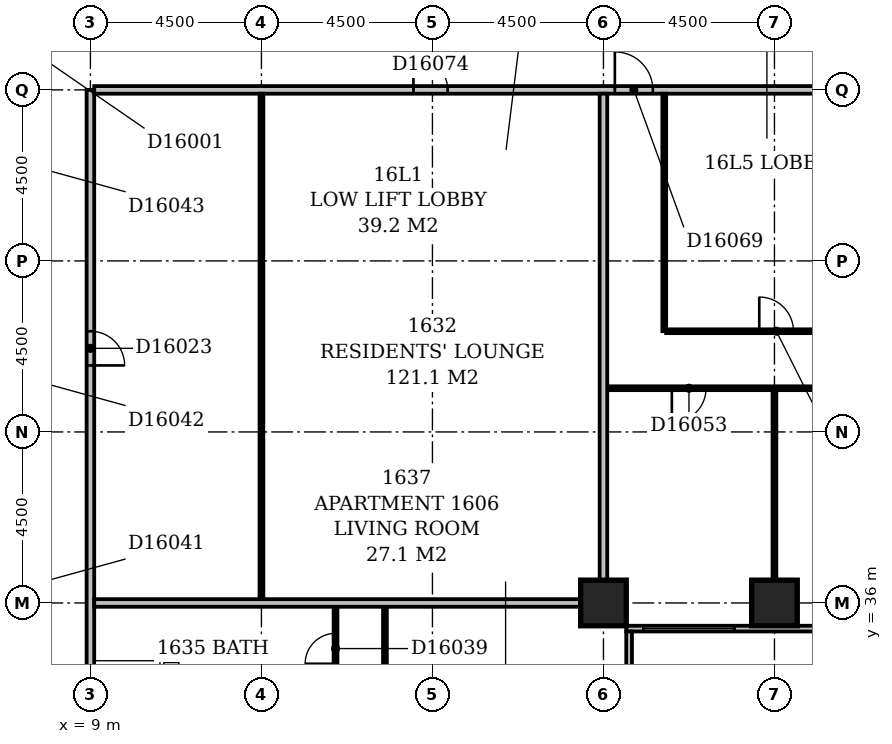
"""IFC4 building model, lengths in metres.
Left out: names, types, materials, properties, quantities, classifications, styles, units other than length and angle.
Written with IfcOpenShell. Run it as: python <this file> out.ifc"""

import sys

from ifc_helpers import new_model, si_unit, direction, frame, frame_2d, origin, origin_2d, place, context, subcontext, project, spatial, rectangle, extrude, element, fill, save


model = new_model("IFC4")
c1 = context("Model", 3, precision=1e-05, world=origin(), true_north=direction((0.0, 1.0)))
c2 = subcontext(c1, "Body", "Model", "MODEL_VIEW")
j1 = project(units=[si_unit("LENGTHUNIT", "METRE"), si_unit("PLANEANGLEUNIT", "RADIAN")], contexts=[c1])
p1 = place(None, origin())
s1 = spatial("IfcSite", under=j1, at=p1, CompositionType="ELEMENT")
p2 = place(p1, origin())
s2 = spatial("IfcBuilding", under=s1, at=p2, CompositionType="ELEMENT")
p3 = place(p2, frame((0.0, 0.0, 68.6)))
s3 = spatial("IfcBuildingStorey", under=s2, at=p3, CompositionType="ELEMENT", Elevation=68.6)
for number, where, z_axis, x_axis in (
    (1, (22.5, 36.0, -0.3), (0.0, 0.0, 1.0), (1.0, 0.0, 0.0)),
    (2, (27.0, 36.0, -0.3), (0.0, 0.0, 1.0), (1.0, 0.0, 0.0)),
):
    element("IfcColumn", number, at=place(p3, frame(where, z_axis=z_axis, x_axis=x_axis)), inside=s3, PredefinedType="COLUMN", context=c2, shape_type="SweptSolid", body=[
        extrude(rectangle(XDim=1.2, YDim=1.2, at=origin_2d()), origin(), (0.0, 0.0, 1.0), 3.6),
    ])
p4 = place(p3, frame((23.175, 17.4, 0.0), z_axis=(0.0, 0.0, 1.0), x_axis=(0.0, 1.0, 0.0)))
e3 = element("IfcWall", 3, at=p4, inside=s3, PredefinedType="STANDARD", context=c2, shape_type="SweptSolid", body=[
    extrude(rectangle(XDim=17.85, YDim=0.15, at=frame_2d((8.925, 0.0))), origin(), (0.0, 0.0, 1.0), 2.7),
])
p5 = place(p4, frame((1.65, 0.0, 0.6)))
e4 = element("IfcOpeningElement", 4, at=p5, cuts=e3, PredefinedType="OPENING", context=c2, shape_type="SweptSolid", body=[
    extrude(rectangle(XDim=2.4, YDim=1.8, at=frame_2d((1.2, 0.9))), frame((0.0, 0.087, 0.0), z_axis=(0.0, -1.0, 0.0), x_axis=(1.0, 0.0, 0.0)), (0.0, 0.0, 1.0), 0.174),
])
p6 = place(p4, frame((6.15, 0.0, 0.6)))
e5 = element("IfcOpeningElement", 5, at=p6, cuts=e3, PredefinedType="OPENING", context=c2, shape_type="SweptSolid", body=[
    extrude(rectangle(XDim=2.4, YDim=1.8, at=frame_2d((1.2, 0.9))), frame((0.0, 0.087, 0.0), z_axis=(0.0, -1.0, 0.0), x_axis=(1.0, 0.0, 0.0)), (0.0, 0.0, 1.0), 0.174),
])
p7 = place(p4, frame((10.65, 0.0, 0.6)))
e6 = element("IfcOpeningElement", 6, at=p7, cuts=e3, PredefinedType="OPENING", context=c2, shape_type="SweptSolid", body=[
    extrude(rectangle(XDim=2.4, YDim=1.8, at=frame_2d((1.2, 0.9))), frame((0.0, 0.087, 0.0), z_axis=(0.0, -1.0, 0.0), x_axis=(1.0, 0.0, 0.0)), (0.0, 0.0, 1.0), 0.174),
])
p8 = place(p4, frame((14.756, 0.0, 0.6)))
e7 = element("IfcOpeningElement", 7, at=p8, cuts=e3, PredefinedType="OPENING", context=c2, shape_type="SweptSolid", body=[
    extrude(rectangle(XDim=0.45, YDim=1.8, at=frame_2d((0.225, 0.9))), frame((0.0, 0.087, 0.0), z_axis=(0.0, -1.0, 0.0), x_axis=(1.0, 0.0, 0.0)), (0.0, 0.0, 1.0), 0.174),
])
p9 = place(p3, frame((23.1, 35.325, 0.0), z_axis=(0.0, 0.0, 1.0), x_axis=(1.0, 0.0, 0.0)))
e8 = element("IfcWall", 8, at=p9, inside=s3, PredefinedType="STANDARD", context=c2, shape_type="SweptSolid", body=[
    extrude(rectangle(XDim=45.15, YDim=0.15, at=frame_2d((22.575, 0.0))), origin(), (0.0, 0.0, 1.0), 2.7),
])
p10 = place(p9, frame((0.45, 0.0, 0.6)))
e9 = element("IfcOpeningElement", 9, at=p10, cuts=e8, PredefinedType="OPENING", context=c2, shape_type="SweptSolid", body=[
    extrude(rectangle(XDim=2.4, YDim=1.8, at=frame_2d((1.2, 0.9))), frame((0.0, 0.087, 0.0), z_axis=(0.0, -1.0, 0.0), x_axis=(1.0, 0.0, 0.0)), (0.0, 0.0, 1.0), 0.174),
])
p11 = place(p9, frame((4.95, 0.0, 0.6)))
e10 = element("IfcOpeningElement", 10, at=p11, cuts=e8, PredefinedType="OPENING", context=c2, shape_type="SweptSolid", body=[
    extrude(rectangle(XDim=2.4, YDim=1.8, at=frame_2d((1.2, 0.9))), frame((0.0, 0.087, 0.0), z_axis=(0.0, -1.0, 0.0), x_axis=(1.0, 0.0, 0.0)), (0.0, 0.0, 1.0), 0.174),
])
p12 = place(p9, frame((9.243, 0.0, 0.6)))
e11 = element("IfcOpeningElement", 11, at=p12, cuts=e8, PredefinedType="OPENING", context=c2, shape_type="SweptSolid", body=[
    extrude(rectangle(XDim=1.8, YDim=1.8, at=frame_2d((0.9, 0.9))), frame((0.0, 0.087, 0.0), z_axis=(0.0, -1.0, 0.0), x_axis=(1.0, 0.0, 0.0)), (0.0, 0.0, 1.0), 0.174),
])
p13 = place(p9, frame((14.97, 0.0, 0.6)))
e12 = element("IfcOpeningElement", 12, at=p13, cuts=e8, PredefinedType="OPENING", context=c2, shape_type="SweptSolid", body=[
    extrude(rectangle(XDim=1.5, YDim=1.8, at=frame_2d((0.75, 0.9))), frame((0.0, 0.087, 0.0), z_axis=(0.0, -1.0, 0.0), x_axis=(1.0, 0.0, 0.0)), (0.0, 0.0, 1.0), 0.174),
])
p14 = place(p9, frame((18.45, 0.0, 0.6)))
e13 = element("IfcOpeningElement", 13, at=p14, cuts=e8, PredefinedType="OPENING", context=c2, shape_type="SweptSolid", body=[
    extrude(rectangle(XDim=2.4, YDim=1.8, at=frame_2d((1.2, 0.9))), frame((0.0, 0.087, 0.0), z_axis=(0.0, -1.0, 0.0), x_axis=(1.0, 0.0, 0.0)), (0.0, 0.0, 1.0), 0.174),
])
p15 = place(p9, frame((22.95, 0.0, 0.6)))
e14 = element("IfcOpeningElement", 14, at=p15, cuts=e8, PredefinedType="OPENING", context=c2, shape_type="SweptSolid", body=[
    extrude(rectangle(XDim=2.4, YDim=1.8, at=frame_2d((1.2, 0.9))), frame((0.0, 0.087, 0.0), z_axis=(0.0, -1.0, 0.0), x_axis=(1.0, 0.0, 0.0)), (0.0, 0.0, 1.0), 0.174),
])
p16 = place(p9, frame((27.45, 0.0, 0.6)))
e15 = element("IfcOpeningElement", 15, at=p16, cuts=e8, PredefinedType="OPENING", context=c2, shape_type="SweptSolid", body=[
    extrude(rectangle(XDim=2.4, YDim=1.8, at=frame_2d((1.2, 0.9))), frame((0.0, 0.087, 0.0), z_axis=(0.0, -1.0, 0.0), x_axis=(1.0, 0.0, 0.0)), (0.0, 0.0, 1.0), 0.174),
])
p17 = place(p9, frame((31.95, 0.0, 0.6)))
e16 = element("IfcOpeningElement", 16, at=p17, cuts=e8, PredefinedType="OPENING", context=c2, shape_type="SweptSolid", body=[
    extrude(rectangle(XDim=2.4, YDim=1.8, at=frame_2d((1.2, 0.9))), frame((0.0, 0.087, 0.0), z_axis=(0.0, -1.0, 0.0), x_axis=(1.0, 0.0, 0.0)), (0.0, 0.0, 1.0), 0.174),
])
p18 = place(p9, frame((36.45, 0.0, 0.6)))
e17 = element("IfcOpeningElement", 17, at=p18, cuts=e8, PredefinedType="OPENING", context=c2, shape_type="SweptSolid", body=[
    extrude(rectangle(XDim=2.4, YDim=1.8, at=frame_2d((1.2, 0.9))), frame((0.0, 0.087, 0.0), z_axis=(0.0, -1.0, 0.0), x_axis=(1.0, 0.0, 0.0)), (0.0, 0.0, 1.0), 0.174),
])
p19 = place(p9, frame((40.706, 0.0, 0.6)))
e18 = element("IfcOpeningElement", 18, at=p19, cuts=e8, PredefinedType="OPENING", context=c2, shape_type="SweptSolid", body=[
    extrude(rectangle(XDim=1.2, YDim=1.8, at=frame_2d((0.6, 0.9))), frame((0.0, 0.087, 0.0), z_axis=(0.0, -1.0, 0.0), x_axis=(1.0, 0.0, 0.0)), (0.0, 0.0, 1.0), 0.174),
])
p20 = place(p3, frame((9.0, 5.0, 0.0), z_axis=(0.0, 0.0, 1.0), x_axis=(0.0, 1.0, 0.0)))
e19 = element("IfcWall", 19, at=p20, inside=s3, PredefinedType="PARTITIONING", context=c2, shape_type="SweptSolid", body=[
    extrude(rectangle(XDim=44.5, YDim=0.2, at=frame_2d((22.25, 0.0))), origin(), (0.0, 0.0, 1.0), 3.3),
])
p21 = place(p20, frame((22.3, 0.0, 0.0)))
e20 = element("IfcOpeningElement", 20, at=p21, cuts=e19, PredefinedType="OPENING", context=c2, shape_type="SweptSolid", body=[
    extrude(rectangle(XDim=1.0, YDim=2.1, at=frame_2d((0.5, 1.05))), frame((0.0, 0.112, 0.0), z_axis=(0.0, -1.0, 0.0), x_axis=(1.0, 0.0, 0.0)), (0.0, 0.0, 1.0), 0.224),
])
p22 = place(p20, frame((15.7, 0.0, 0.0)))
e21 = element("IfcOpeningElement", 21, at=p22, cuts=e19, PredefinedType="OPENING", context=c2, shape_type="SweptSolid", body=[
    extrude(rectangle(XDim=1.0, YDim=2.1, at=frame_2d((0.5, 1.05))), frame((0.0, 0.112, 0.0), z_axis=(0.0, -1.0, 0.0), x_axis=(1.0, 0.0, 0.0)), (0.0, 0.0, 1.0), 0.224),
])
p23 = place(p20, frame((10.45, 0.0, 0.0)))
e22 = element("IfcOpeningElement", 22, at=p23, cuts=e19, PredefinedType="OPENING", context=c2, shape_type="SweptSolid", body=[
    extrude(rectangle(XDim=1.0, YDim=2.1, at=frame_2d((0.5, 1.05))), frame((0.0, 0.112, 0.0), z_axis=(0.0, -1.0, 0.0), x_axis=(1.0, 0.0, 0.0)), (0.0, 0.0, 1.0), 0.224),
])
p24 = place(p20, frame((5.95, 0.0, 0.0)))
e23 = element("IfcOpeningElement", 23, at=p24, cuts=e19, PredefinedType="OPENING", context=c2, shape_type="SweptSolid", body=[
    extrude(rectangle(XDim=1.0, YDim=2.1, at=frame_2d((0.5, 1.05))), frame((0.0, 0.112, 0.0), z_axis=(0.0, -1.0, 0.0), x_axis=(1.0, 0.0, 0.0)), (0.0, 0.0, 1.0), 0.224),
])
p25 = place(p20, frame((37.25, 0.0, 0.0)))
e24 = element("IfcOpeningElement", 24, at=p25, cuts=e19, PredefinedType="OPENING", context=c2, shape_type="SweptSolid", body=[
    extrude(rectangle(XDim=0.9, YDim=2.1, at=frame_2d((0.45, 1.05))), frame((0.0, 0.112, 0.0), z_axis=(0.0, -1.0, 0.0), x_axis=(1.0, 0.0, 0.0)), (0.0, 0.0, 1.0), 0.224),
])
p26 = place(p20, frame((1.5, 0.0, 0.0)))
e25 = element("IfcOpeningElement", 25, at=p26, cuts=e19, PredefinedType="OPENING", context=c2, shape_type="SweptSolid", body=[
    extrude(rectangle(XDim=0.9, YDim=2.1, at=frame_2d((0.45, 1.05))), frame((0.0, 0.112, 0.0), z_axis=(0.0, -1.0, 0.0), x_axis=(1.0, 0.0, 0.0)), (0.0, 0.0, 1.0), 0.224),
])
p27 = place(p3, frame((16.75, 27.1, 0.0), z_axis=(0.0, 0.0, 1.0), x_axis=(0.0, 1.0, 0.0)))
e26 = element("IfcWall", 26, at=p27, inside=s3, PredefinedType="PARTITIONING", context=c2, shape_type="SweptSolid", body=[
    extrude(rectangle(XDim=8.8, YDim=0.1, at=frame_2d((4.4, 0.0))), origin(), (0.0, 0.0, 1.0), 3.3),
])
p28 = place(p27, frame((1.7, 0.0, 0.0)))
e27 = element("IfcOpeningElement", 27, at=p28, cuts=e26, PredefinedType="OPENING", context=c2, shape_type="SweptSolid", body=[
    extrude(rectangle(XDim=0.9, YDim=2.1, at=frame_2d((0.45, 1.05))), frame((0.0, 0.062, 0.0), z_axis=(0.0, -1.0, 0.0), x_axis=(1.0, 0.0, 0.0)), (0.0, 0.0, 1.0), 0.124),
])
p29 = place(p27, frame((6.2, 0.0, 0.0)))
e28 = element("IfcOpeningElement", 28, at=p29, cuts=e26, PredefinedType="OPENING", context=c2, shape_type="SweptSolid", body=[
    extrude(rectangle(XDim=0.9, YDim=2.1, at=frame_2d((0.45, 1.05))), frame((0.0, 0.062, 0.0), z_axis=(0.0, -1.0, 0.0), x_axis=(1.0, 0.0, 0.0)), (0.0, 0.0, 1.0), 0.124),
])
p30 = place(p3, frame((15.45, 28.6, 0.0), z_axis=(0.0, 0.0, 1.0), x_axis=(0.0, 1.0, 0.0)))
e29 = element("IfcWall", 29, at=p30, inside=s3, PredefinedType="PARTITIONING", context=c2, shape_type="SweptSolid", body=[
    extrude(rectangle(XDim=7.3, YDim=0.1, at=frame_2d((3.65, 0.0))), origin(), (0.0, 0.0, 1.0), 3.3),
])
p31 = place(p30, frame((5.8, 0.0, 0.0)))
e30 = element("IfcOpeningElement", 30, at=p31, cuts=e29, PredefinedType="OPENING", context=c2, shape_type="SweptSolid", body=[
    extrude(rectangle(XDim=0.8, YDim=2.1, at=frame_2d((0.4, 1.05))), frame((0.0, 0.062, 0.0), z_axis=(0.0, -1.0, 0.0), x_axis=(1.0, 0.0, 0.0)), (0.0, 0.0, 1.0), 0.124),
])
p32 = place(p30, frame((2.05, 0.0, 0.0)))
e31 = element("IfcOpeningElement", 31, at=p32, cuts=e29, PredefinedType="OPENING", context=c2, shape_type="SweptSolid", body=[
    extrude(rectangle(XDim=0.9, YDim=2.1, at=frame_2d((0.45, 1.05))), frame((0.0, 0.062, 0.0), z_axis=(0.0, -1.0, 0.0), x_axis=(1.0, 0.0, 0.0)), (0.0, 0.0, 1.0), 0.124),
])
p33 = place(p3, frame((9.1, 36.0, 0.0), z_axis=(0.0, 0.0, 1.0), x_axis=(1.0, 0.0, 0.0)))
e32 = element("IfcWall", 32, at=p33, inside=s3, PredefinedType="PARTITIONING", context=c2, shape_type="SweptSolid", body=[
    extrude(rectangle(XDim=12.8, YDim=0.2, at=frame_2d((6.4, 0.0))), origin(), (0.0, 0.0, 1.0), 2.4),
])
p34 = place(p3, frame((13.5, 36.1, 0.0), z_axis=(0.0, 0.0, 1.0), x_axis=(0.0, 1.0, 0.0)))
e33 = element("IfcWall", 33, at=p34, inside=s3, PredefinedType="PARTITIONING", context=c2, shape_type="SweptSolid", body=[
    extrude(rectangle(XDim=13.3, YDim=0.1, at=frame_2d((6.65, 0.0))), origin(), (0.0, 0.0, 1.0), 3.3),
])
p35 = place(p3, frame((22.5, 36.6, 0.0), z_axis=(0.0, 0.0, 1.0), x_axis=(0.0, 1.0, 0.0)))
e34 = element("IfcWall", 34, at=p35, inside=s3, PredefinedType="PARTITIONING", context=c2, shape_type="SweptSolid", body=[
    extrude(rectangle(XDim=12.8, YDim=0.2, at=frame_2d((6.4, 0.0))), origin(), (0.0, 0.0, 1.0), 3.3),
])
p36 = place(p3, frame((27.0, 36.6, 0.0), z_axis=(0.0, 0.0, 1.0), x_axis=(0.0, 1.0, 0.0)))
e35 = element("IfcWall", 35, at=p36, inside=s3, PredefinedType="PARTITIONING", context=c2, shape_type="SweptSolid", body=[
    extrude(rectangle(XDim=5.0, YDim=0.1, at=frame_2d((2.5, 0.0))), origin(), (0.0, 0.0, 1.0), 2.6),
])
p37 = place(p3, frame((22.6, 41.65, 0.0), z_axis=(0.0, 0.0, 1.0), x_axis=(1.0, 0.0, 0.0)))
e36 = element("IfcWall", 36, at=p37, inside=s3, PredefinedType="PARTITIONING", context=c2, shape_type="SweptSolid", body=[
    extrude(rectangle(XDim=13.3, YDim=0.1, at=frame_2d((6.65, 0.0))), origin(), (0.0, 0.0, 1.0), 3.3),
])
p38 = place(p37, frame((1.7, 0.0, 0.0)))
e37 = element("IfcOpeningElement", 37, at=p38, cuts=e36, PredefinedType="OPENING", context=c2, shape_type="SweptSolid", body=[
    extrude(rectangle(XDim=0.9, YDim=2.1, at=frame_2d((0.45, 1.05))), frame((0.0, 0.062, 0.0), z_axis=(0.0, -1.0, 0.0), x_axis=(1.0, 0.0, 0.0)), (0.0, 0.0, 1.0), 0.124),
])
p39 = place(p37, frame((6.2, 0.0, 0.0)))
e38 = element("IfcOpeningElement", 38, at=p39, cuts=e36, PredefinedType="OPENING", context=c2, shape_type="SweptSolid", body=[
    extrude(rectangle(XDim=0.9, YDim=2.1, at=frame_2d((0.45, 1.05))), frame((0.0, 0.062, 0.0), z_axis=(0.0, -1.0, 0.0), x_axis=(1.0, 0.0, 0.0)), (0.0, 0.0, 1.0), 0.124),
])
p40 = place(p37, frame((10.7, 0.0, 0.0)))
e39 = element("IfcOpeningElement", 39, at=p40, cuts=e36, PredefinedType="OPENING", context=c2, shape_type="SweptSolid", body=[
    extrude(rectangle(XDim=0.9, YDim=2.1, at=frame_2d((0.45, 1.05))), frame((0.0, 0.062, 0.0), z_axis=(0.0, -1.0, 0.0), x_axis=(1.0, 0.0, 0.0)), (0.0, 0.0, 1.0), 0.124),
])
p41 = place(p3, frame((24.1, 43.15, 0.0), z_axis=(0.0, 0.0, 1.0), x_axis=(0.0, 1.0, 0.0)))
e40 = element("IfcWall", 40, at=p41, inside=s3, PredefinedType="PARTITIONING", context=c2, shape_type="SweptSolid", body=[
    extrude(rectangle(XDim=6.25, YDim=0.1, at=frame_2d((3.125, 0.0))), origin(), (0.0, 0.0, 1.0), 3.3),
])
p42 = place(p3, frame((24.15, 43.15, 0.0), z_axis=(0.0, 0.0, 1.0), x_axis=(1.0, 0.0, 0.0)))
e41 = element("IfcWall", 41, at=p42, inside=s3, PredefinedType="PARTITIONING", context=c2, shape_type="SweptSolid", body=[
    extrude(rectangle(XDim=11.75, YDim=0.1, at=frame_2d((5.875, 0.0))), origin(), (0.0, 0.0, 1.0), 3.3),
])
p43 = place(p42, frame((6.65, 0.0, 0.0)))
e42 = element("IfcOpeningElement", 42, at=p43, cuts=e41, PredefinedType="OPENING", context=c2, shape_type="SweptSolid", body=[
    extrude(rectangle(XDim=0.8, YDim=2.1, at=frame_2d((0.4, 1.05))), frame((0.0, 0.062, 0.0), z_axis=(0.0, -1.0, 0.0), x_axis=(1.0, 0.0, 0.0)), (0.0, 0.0, 1.0), 0.124),
])
p44 = place(p42, frame((2.45, 0.0, 0.0)))
e43 = element("IfcOpeningElement", 43, at=p44, cuts=e41, PredefinedType="OPENING", context=c2, shape_type="SweptSolid", body=[
    extrude(rectangle(XDim=0.9, YDim=2.1, at=frame_2d((0.45, 1.05))), frame((0.0, 0.062, 0.0), z_axis=(0.0, -1.0, 0.0), x_axis=(1.0, 0.0, 0.0)), (0.0, 0.0, 1.0), 0.124),
])
p45 = place(p42, frame((8.65, 0.0, 0.0)))
e44 = element("IfcOpeningElement", 44, at=p45, cuts=e41, PredefinedType="OPENING", context=c2, shape_type="SweptSolid", body=[
    extrude(rectangle(XDim=0.8, YDim=2.1, at=frame_2d((0.4, 1.05))), frame((0.0, 0.062, 0.0), z_axis=(0.0, -1.0, 0.0), x_axis=(1.0, 0.0, 0.0)), (0.0, 0.0, 1.0), 0.124),
])
p46 = place(p42, frame((10.45, 0.0, 0.0)))
e45 = element("IfcOpeningElement", 45, at=p46, cuts=e41, PredefinedType="OPENING", context=c2, shape_type="SweptSolid", body=[
    extrude(rectangle(XDim=0.8, YDim=2.1, at=frame_2d((0.4, 1.05))), frame((0.0, 0.062, 0.0), z_axis=(0.0, -1.0, 0.0), x_axis=(1.0, 0.0, 0.0)), (0.0, 0.0, 1.0), 0.124),
])
p47 = place(p3, frame((9.1, 49.5, 0.0), z_axis=(0.0, 0.0, 1.0), x_axis=(1.0, 0.0, 0.0)))
e46 = element("IfcWall", 46, at=p47, inside=s3, PredefinedType="PARTITIONING", context=c2, shape_type="SweptSolid", body=[
    extrude(rectangle(XDim=57.8, YDim=0.2, at=frame_2d((28.9, 0.0))), origin(), (0.0, 0.0, 1.0), 3.3),
])
p48 = place(p47, frame((13.7, 0.0, 0.0)))
e47 = element("IfcOpeningElement", 47, at=p48, cuts=e46, PredefinedType="OPENING", context=c2, shape_type="SweptSolid", body=[
    extrude(rectangle(XDim=1.0, YDim=2.1, at=frame_2d((0.5, 1.05))), frame((0.0, 0.112, 0.0), z_axis=(0.0, -1.0, 0.0), x_axis=(1.0, 0.0, 0.0)), (0.0, 0.0, 1.0), 0.224),
])
p49 = place(p47, frame((32.2, 0.0, 0.0)))
e48 = element("IfcOpeningElement", 48, at=p49, cuts=e46, PredefinedType="OPENING", context=c2, shape_type="SweptSolid", body=[
    extrude(rectangle(XDim=1.0, YDim=2.1, at=frame_2d((0.5, 1.05))), frame((0.0, 0.112, 0.0), z_axis=(0.0, -1.0, 0.0), x_axis=(1.0, 0.0, 0.0)), (0.0, 0.0, 1.0), 0.224),
])
p50 = place(p47, frame((37.85, 0.0, 0.0)))
e49 = element("IfcOpeningElement", 49, at=p50, cuts=e46, PredefinedType="OPENING", context=c2, shape_type="SweptSolid", body=[
    extrude(rectangle(XDim=1.0, YDim=2.1, at=frame_2d((0.5, 1.05))), frame((0.0, 0.112, 0.0), z_axis=(0.0, -1.0, 0.0), x_axis=(1.0, 0.0, 0.0)), (0.0, 0.0, 1.0), 0.224),
])
p51 = place(p47, frame((45.7, 0.0, 0.0)))
e50 = element("IfcOpeningElement", 50, at=p51, cuts=e46, PredefinedType="OPENING", context=c2, shape_type="SweptSolid", body=[
    extrude(rectangle(XDim=1.0, YDim=2.1, at=frame_2d((0.5, 1.05))), frame((0.0, 0.112, 0.0), z_axis=(0.0, -1.0, 0.0), x_axis=(1.0, 0.0, 0.0)), (0.0, 0.0, 1.0), 0.224),
])
p52 = place(p47, frame((49.7, 0.0, 0.0)))
e51 = element("IfcOpeningElement", 51, at=p52, cuts=e46, PredefinedType="OPENING", context=c2, shape_type="SweptSolid", body=[
    extrude(rectangle(XDim=1.0, YDim=2.1, at=frame_2d((0.5, 1.05))), frame((0.0, 0.112, 0.0), z_axis=(0.0, -1.0, 0.0), x_axis=(1.0, 0.0, 0.0)), (0.0, 0.0, 1.0), 0.224),
])
p53 = place(p47, frame((8.4, 0.0, 0.0)))
e52 = element("IfcOpeningElement", 52, at=p53, cuts=e46, PredefinedType="OPENING", context=c2, shape_type="SweptSolid", body=[
    extrude(rectangle(XDim=0.9, YDim=2.1, at=frame_2d((0.45, 1.05))), frame((0.0, 0.112, 0.0), z_axis=(0.0, -1.0, 0.0), x_axis=(1.0, 0.0, 0.0)), (0.0, 0.0, 1.0), 0.224),
])
p54 = place(p10, origin())
e53 = element("IfcWindow", 53, at=p54, inside=s3, PartitioningType="SINGLE_PANEL", PredefinedType="WINDOW", context=c2, shape_type="SweptSolid", body=[
    extrude(rectangle(XDim=2.4, YDim=1.8, at=frame_2d((1.2, 0.9))), frame((0.0, 0.03, 0.0), z_axis=(0.0, -1.0, 0.0), x_axis=(1.0, 0.0, 0.0)), (0.0, 0.0, 1.0), 0.06),
])
fill(e9, e53)
p55 = place(p25, frame((0.9, 0.0, 0.0), z_axis=(0.0, 0.0, 1.0), x_axis=(-1.0, 0.0, 0.0)))
e54 = element("IfcDoor", 54, at=p55, inside=s3, OperationType="SINGLE_SWING_RIGHT", PredefinedType="DOOR", context=c2, shape_type="SweptSolid", body=[
    extrude(rectangle(XDim=0.9, YDim=2.1, at=frame_2d((0.45, 1.05))), frame((0.0, 0.025, 0.0), z_axis=(0.0, -1.0, 0.0), x_axis=(1.0, 0.0, 0.0)), (0.0, 0.0, 1.0), 0.05),
])
fill(e24, e54)
p56 = place(p31, origin())
e55 = element("IfcDoor", 55, at=p56, inside=s3, OperationType="SINGLE_SWING_LEFT", PredefinedType="DOOR", context=c2, shape_type="SweptSolid", body=[
    extrude(rectangle(XDim=0.8, YDim=2.1, at=frame_2d((0.4, 1.05))), frame((0.0, 0.025, 0.0), z_axis=(0.0, -1.0, 0.0), x_axis=(1.0, 0.0, 0.0)), (0.0, 0.0, 1.0), 0.05),
])
fill(e30, e55)
p57 = place(p38, frame((0.9, 0.0, 0.0), z_axis=(0.0, 0.0, 1.0), x_axis=(-1.0, 0.0, 0.0)))
e56 = element("IfcDoor", 56, at=p57, inside=s3, OperationType="SINGLE_SWING_RIGHT", PredefinedType="DOOR", context=c2, shape_type="SweptSolid", body=[
    extrude(rectangle(XDim=0.9, YDim=2.1, at=frame_2d((0.45, 1.05))), frame((0.0, 0.025, 0.0), z_axis=(0.0, -1.0, 0.0), x_axis=(1.0, 0.0, 0.0)), (0.0, 0.0, 1.0), 0.05),
])
fill(e37, e56)
p58 = place(p44, origin())
e57 = element("IfcDoor", 57, at=p58, inside=s3, OperationType="SINGLE_SWING_LEFT", PredefinedType="DOOR", context=c2, shape_type="SweptSolid", body=[
    extrude(rectangle(XDim=0.9, YDim=2.1, at=frame_2d((0.45, 1.05))), frame((0.0, 0.025, 0.0), z_axis=(0.0, -1.0, 0.0), x_axis=(1.0, 0.0, 0.0)), (0.0, 0.0, 1.0), 0.05),
])
fill(e43, e57)
p59 = place(p48, origin())
e58 = element("IfcDoor", 58, at=p59, inside=s3, OperationType="SINGLE_SWING_LEFT", PredefinedType="DOOR", context=c2, shape_type="SweptSolid", body=[
    extrude(rectangle(XDim=1.0, YDim=2.1, at=frame_2d((0.5, 1.05))), frame((0.0, 0.025, 0.0), z_axis=(0.0, -1.0, 0.0), x_axis=(1.0, 0.0, 0.0)), (0.0, 0.0, 1.0), 0.05),
])
fill(e47, e58)
p60 = place(p53, origin())
e59 = element("IfcDoor", 59, at=p60, inside=s3, OperationType="SINGLE_SWING_LEFT", PredefinedType="DOOR", context=c2, shape_type="SweptSolid", body=[
    extrude(rectangle(XDim=0.9, YDim=2.1, at=frame_2d((0.45, 1.05))), frame((0.0, 0.025, 0.0), z_axis=(0.0, -1.0, 0.0), x_axis=(1.0, 0.0, 0.0)), (0.0, 0.0, 1.0), 0.05),
])
fill(e52, e59)
save(model, sys.argv[1])
